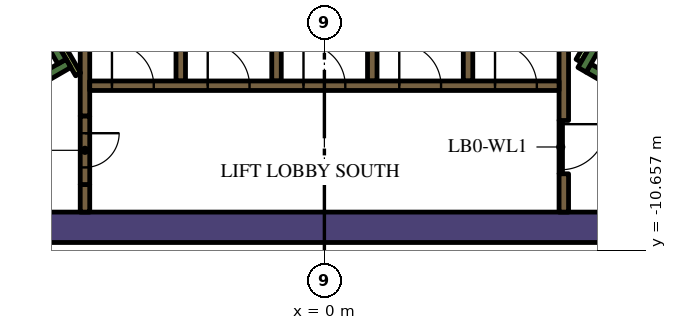
"""IFC4 building model, lengths in metres.
Left out: names, types, materials, properties, quantities, classifications, styles, units other than length and angle.
Written with IfcOpenShell. Run it as: python <this file> out.ifc"""

import sys

from ifc_helpers import new_model, si_unit, direction, frame, frame_2d, origin, place, context, subcontext, project, spatial, rectangle, extrude, element, fill, save


model = new_model("IFC4")
c1 = context("Model", 3, precision=1e-05, world=origin(), true_north=direction((0.0, 1.0)))
c2 = subcontext(c1, "Body", "Model", "MODEL_VIEW")
j1 = project(units=[si_unit("LENGTHUNIT", "METRE"), si_unit("PLANEANGLEUNIT", "RADIAN")], contexts=[c1])
p1 = place(None, origin())
s1 = spatial("IfcSite", under=j1, at=p1, CompositionType="ELEMENT")
p2 = place(p1, origin())
s2 = spatial("IfcBuilding", under=s1, at=p2, CompositionType="ELEMENT")
p3 = place(p2, frame((0.0, 0.0, 187.8)))
s3 = spatial("IfcBuildingStorey", under=s2, at=p3, CompositionType="ELEMENT", Elevation=187.8)
p4 = place(p3, frame((-13.378, -10.05, 0.0), z_axis=(0.0, 0.0, 1.0), x_axis=(1.0, 0.0, 0.0)))
e1 = element("IfcWall", 1, at=p4, inside=s3, PredefinedType="SOLIDWALL", context=c2, shape_type="SweptSolid", body=[
    extrude(rectangle(XDim=22.282, YDim=0.8, at=frame_2d((11.141, 0.0))), origin(), (0.0, 0.0, 1.0), 4.2),
])
p5 = place(p3, frame((12.84, -9.261, 0.0), z_axis=(0.0, 0.0, 1.0), x_axis=(-0.866013990052, 0.500019768644, 0.0)))
e2 = element("IfcWall", 2, at=p5, inside=s3, PredefinedType="SOLIDWALL", context=c2, shape_type="SweptSolid", body=[
    extrude(rectangle(XDim=6.8, YDim=0.25, at=frame_2d((3.4, 0.0))), origin(), (0.0, 0.0, 1.0), 4.2),
])
p6 = place(p3, frame((6.78, -5.906, 0.0), z_axis=(0.0, 0.0, 1.0), x_axis=(0.500223362819, 0.865896406789, 0.0)))
e3 = element("IfcWall", 3, at=p6, inside=s3, PredefinedType="SOLIDWALL", context=c2, shape_type="SweptSolid", body=[
    extrude(rectangle(XDim=0.675, YDim=0.25, at=frame_2d((0.337, 0.0))), origin(), (0.0, 0.0, 1.0), 4.2),
])
p7 = place(p3, frame((-12.84, -9.261, 0.0), z_axis=(0.0, 0.0, 1.0), x_axis=(0.866016039709, 0.500016218704, 0.0)))
e4 = element("IfcWall", 4, at=p7, inside=s3, PredefinedType="SOLIDWALL", context=c2, shape_type="SweptSolid", body=[
    extrude(rectangle(XDim=7.05, YDim=0.25, at=frame_2d((3.525, 0.0))), origin(), (0.0, 0.0, 1.0), 4.2),
])
p8 = place(p3, frame((-6.905, -5.69, 0.0), z_axis=(0.0, 0.0, 1.0), x_axis=(-0.500402024738, 0.865793170242, 0.0)))
e5 = element("IfcWall", 5, at=p8, inside=s3, PredefinedType="SOLIDWALL", context=c2, shape_type="SweptSolid", body=[
    extrude(rectangle(XDim=0.425, YDim=0.25, at=frame_2d((0.212, 0.0))), origin(), (0.0, 0.0, 1.0), 4.2),
])
p9 = place(p3, frame((-6.3, -8.925, 0.0), z_axis=(0.0, 0.0, 1.0), x_axis=(0.0, -1.0, 0.0)))
e6 = element("IfcWall", 6, at=p9, inside=s3, PredefinedType="SOLIDWALL", context=c2, shape_type="SweptSolid", body=[
    extrude(rectangle(XDim=0.725, YDim=0.25, at=frame_2d((0.363, 0.0))), origin(), (0.0, 0.0, 1.0), 4.2),
])
p10 = place(p3, frame((6.3, -7.24, 0.0), z_axis=(0.0, 0.0, 1.0), x_axis=(0.0, 1.0, 0.0)))
e7 = element("IfcWall", 7, at=p10, inside=s3, PredefinedType="SOLIDWALL", context=c2, shape_type="SweptSolid", body=[
    extrude(rectangle(XDim=3.24, YDim=0.25, at=frame_2d((1.62, 0.0))), origin(), (0.0, 0.0, 1.0), 4.2),
])
p11 = place(p3, frame((6.3, -9.65, 0.0), z_axis=(0.0, 0.0, 1.0), x_axis=(0.0, 1.0, 0.0)))
e8 = element("IfcWall", 8, at=p11, inside=s3, PredefinedType="SOLIDWALL", context=c2, shape_type="SweptSolid", body=[
    extrude(rectangle(XDim=1.008, YDim=0.25, at=frame_2d((0.504, 0.0))), origin(), (0.0, 0.0, 1.0), 4.2),
])
for number, where, z_axis, x_axis in (
    (9, (3.78, -4.0, 0.0), (0.0, 0.0, 1.0), (0.0, -1.0, 0.0)),
    (10, (1.26, -4.0, 0.0), (0.0, 0.0, 1.0), (0.0, -1.0, 0.0)),
    (11, (-1.26, -4.0, 0.0), (0.0, 0.0, 1.0), (0.0, -1.0, 0.0)),
    (12, (-3.78, -4.0, 0.0), (0.0, 0.0, 1.0), (0.0, -1.0, 0.0)),
):
    element("IfcWall", number, at=place(p3, frame(where, z_axis=z_axis, x_axis=x_axis)), inside=s3, PredefinedType="SOLIDWALL", context=c2, shape_type="SweptSolid", body=[
        extrude(rectangle(XDim=2.2, YDim=0.25, at=frame_2d((1.1, 0.0))), origin(), (0.0, 0.0, 1.0), 4.2),
    ])
p12 = place(p3, frame((-6.3, -7.125, 0.0), z_axis=(0.0, 0.0, 1.0), x_axis=(0.0, 1.0, 0.0)))
e13 = element("IfcWall", 13, at=p12, inside=s3, PredefinedType="SOLIDWALL", context=c2, shape_type="SweptSolid", body=[
    extrude(rectangle(XDim=3.125, YDim=0.25, at=frame_2d((1.562, 0.0))), origin(), (0.0, 0.0, 1.0), 4.2),
])
p13 = place(p3, frame((-6.48, -6.027, 0.0), z_axis=(0.0, 0.0, 1.0), x_axis=(-0.499927229454, 0.866067413802, 0.0)))
e14 = element("IfcWall", 14, at=p13, inside=s3, PredefinedType="PARTITIONING", context=c2, shape_type="SweptSolid", body=[
    extrude(rectangle(XDim=0.929, YDim=0.15, at=frame_2d((0.464, 0.0))), origin(), (0.0, 0.0, 1.0), 4.2),
])
p14 = place(p3, frame((6.945, -5.222, 0.0), z_axis=(0.0, 0.0, 1.0), x_axis=(-0.499818422106, -0.866130212453, 0.0)))
e15 = element("IfcWall", 15, at=p14, inside=s3, PredefinedType="PARTITIONING", context=c2, shape_type="SweptSolid", body=[
    extrude(rectangle(XDim=0.514, YDim=0.15, at=frame_2d((0.257, 0.0))), origin(), (0.0, 0.0, 1.0), 3.15),
])
p15 = place(p3, frame((-6.175, -6.325, 0.0), z_axis=(0.0, 0.0, 1.0), x_axis=(1.0, 0.0, 0.0)))
e16 = element("IfcWall", 16, at=p15, inside=s3, PredefinedType="SOLIDWALL", context=c2, shape_type="SweptSolid", body=[
    extrude(rectangle(XDim=12.35, YDim=0.25, at=frame_2d((6.175, 0.0))), origin(), (0.0, 0.0, 1.0), 4.2),
])
p16 = place(p15, frame((0.585, 0.0, 0.0)))
e17 = element("IfcOpeningElement", 17, at=p16, cuts=e16, PredefinedType="OPENING", context=c2, shape_type="SweptSolid", body=[
    extrude(rectangle(XDim=1.1, YDim=2.1, at=frame_2d((0.55, 1.05))), frame((0.0, 0.135, 0.0), z_axis=(0.0, -1.0, 0.0), x_axis=(1.0, 0.0, 0.0)), (0.0, 0.0, 1.0), 0.27),
])
p17 = place(p15, frame((3.105, 0.0, 0.0)))
e18 = element("IfcOpeningElement", 18, at=p17, cuts=e16, PredefinedType="OPENING", context=c2, shape_type="SweptSolid", body=[
    extrude(rectangle(XDim=1.1, YDim=2.1, at=frame_2d((0.55, 1.05))), frame((0.0, 0.135, 0.0), z_axis=(0.0, -1.0, 0.0), x_axis=(1.0, 0.0, 0.0)), (0.0, 0.0, 1.0), 0.27),
])
p18 = place(p15, frame((5.625, 0.0, 0.0)))
e19 = element("IfcOpeningElement", 19, at=p18, cuts=e16, PredefinedType="OPENING", context=c2, shape_type="SweptSolid", body=[
    extrude(rectangle(XDim=1.1, YDim=2.1, at=frame_2d((0.55, 1.05))), frame((0.0, 0.135, 0.0), z_axis=(0.0, -1.0, 0.0), x_axis=(1.0, 0.0, 0.0)), (0.0, 0.0, 1.0), 0.27),
])
p19 = place(p15, frame((8.145, 0.0, 0.0)))
e20 = element("IfcOpeningElement", 20, at=p19, cuts=e16, PredefinedType="OPENING", context=c2, shape_type="SweptSolid", body=[
    extrude(rectangle(XDim=1.1, YDim=2.1, at=frame_2d((0.55, 1.05))), frame((0.0, 0.135, 0.0), z_axis=(0.0, -1.0, 0.0), x_axis=(1.0, 0.0, 0.0)), (0.0, 0.0, 1.0), 0.27),
])
p20 = place(p15, frame((10.665, 0.0, 0.0)))
e21 = element("IfcOpeningElement", 21, at=p20, cuts=e16, PredefinedType="OPENING", context=c2, shape_type="SweptSolid", body=[
    extrude(rectangle(XDim=1.1, YDim=2.1, at=frame_2d((0.55, 1.05))), frame((0.0, 0.135, 0.0), z_axis=(0.0, -1.0, 0.0), x_axis=(1.0, 0.0, 0.0)), (0.0, 0.0, 1.0), 0.27),
])
p21 = place(p3, frame((-6.3, -7.125, 0.0), z_axis=(0.0, 0.0, 1.0), x_axis=(0.0, -1.0, 0.0)))
e22 = element("IfcWall", 22, at=p21, inside=s3, PredefinedType="SOLIDWALL", context=c2, shape_type="SweptSolid", body=[
    extrude(rectangle(XDim=1.8, YDim=0.25, at=frame_2d((0.9, 0.0))), origin(), (0.0, 0.0, 1.0), 4.2),
])
p22 = place(p21, frame((0.45, 0.0, 0.0)))
e23 = element("IfcOpeningElement", 23, at=p22, cuts=e22, PredefinedType="OPENING", context=c2, shape_type="SweptSolid", body=[
    extrude(rectangle(XDim=0.9, YDim=2.1, at=frame_2d((0.45, 1.05))), frame((0.0, 0.135, 0.0), z_axis=(0.0, -1.0, 0.0), x_axis=(1.0, 0.0, 0.0)), (0.0, 0.0, 1.0), 0.27),
])
p23 = place(p3, frame((6.22, -7.237, 0.0), z_axis=(0.0, 0.0, 1.0), x_axis=(0.0, -1.0, 0.0)))
e24 = element("IfcWall", 24, at=p23, inside=s3, PredefinedType="PARTITIONING", context=c2, shape_type="SweptSolid", body=[
    extrude(rectangle(XDim=1.4, YDim=0.09, at=frame_2d((0.7, 0.0))), origin(), (0.0, 0.0, 1.0), 3.15),
])
p24 = place(p23, frame((0.1, 0.0, 0.0)))
e25 = element("IfcOpeningElement", 25, at=p24, cuts=e24, PredefinedType="OPENING", context=c2, shape_type="SweptSolid", body=[
    extrude(rectangle(XDim=1.2, YDim=2.1, at=frame_2d((0.6, 1.05))), frame((0.0, 0.055, 0.0), z_axis=(0.0, -1.0, 0.0), x_axis=(1.0, 0.0, 0.0)), (0.0, 0.0, 1.0), 0.11),
])
p25 = place(p16, origin())
e26 = element("IfcDoor", 26, at=p25, inside=s3, OperationType="DOUBLE_DOOR_SLIDING", PredefinedType="DOOR", context=c2, shape_type="SweptSolid", body=[
    extrude(rectangle(XDim=1.1, YDim=2.1, at=frame_2d((0.55, 1.05))), frame((0.0, 0.025, 0.0), z_axis=(0.0, -1.0, 0.0), x_axis=(1.0, 0.0, 0.0)), (0.0, 0.0, 1.0), 0.05),
])
fill(e17, e26)
p26 = place(p17, origin())
e27 = element("IfcDoor", 27, at=p26, inside=s3, OperationType="DOUBLE_DOOR_SLIDING", PredefinedType="DOOR", context=c2, shape_type="SweptSolid", body=[
    extrude(rectangle(XDim=1.1, YDim=2.1, at=frame_2d((0.55, 1.05))), frame((0.0, 0.025, 0.0), z_axis=(0.0, -1.0, 0.0), x_axis=(1.0, 0.0, 0.0)), (0.0, 0.0, 1.0), 0.05),
])
fill(e18, e27)
p27 = place(p18, origin())
e28 = element("IfcDoor", 28, at=p27, inside=s3, OperationType="DOUBLE_DOOR_SLIDING", PredefinedType="DOOR", context=c2, shape_type="SweptSolid", body=[
    extrude(rectangle(XDim=1.1, YDim=2.1, at=frame_2d((0.55, 1.05))), frame((0.0, 0.025, 0.0), z_axis=(0.0, -1.0, 0.0), x_axis=(1.0, 0.0, 0.0)), (0.0, 0.0, 1.0), 0.05),
])
fill(e19, e28)
p28 = place(p19, origin())
e29 = element("IfcDoor", 29, at=p28, inside=s3, OperationType="DOUBLE_DOOR_SLIDING", PredefinedType="DOOR", context=c2, shape_type="SweptSolid", body=[
    extrude(rectangle(XDim=1.1, YDim=2.1, at=frame_2d((0.55, 1.05))), frame((0.0, 0.025, 0.0), z_axis=(0.0, -1.0, 0.0), x_axis=(1.0, 0.0, 0.0)), (0.0, 0.0, 1.0), 0.05),
])
fill(e20, e29)
p29 = place(p20, origin())
e30 = element("IfcDoor", 30, at=p29, inside=s3, OperationType="DOUBLE_DOOR_SLIDING", PredefinedType="DOOR", context=c2, shape_type="SweptSolid", body=[
    extrude(rectangle(XDim=1.1, YDim=2.1, at=frame_2d((0.55, 1.05))), frame((0.0, 0.025, 0.0), z_axis=(0.0, -1.0, 0.0), x_axis=(1.0, 0.0, 0.0)), (0.0, 0.0, 1.0), 0.05),
])
fill(e21, e30)
p30 = place(p22, origin())
e31 = element("IfcDoor", 31, at=p30, inside=s3, OperationType="SINGLE_SWING_LEFT", PredefinedType="DOOR", context=c2, shape_type="SweptSolid", body=[
    extrude(rectangle(XDim=0.9, YDim=2.1, at=frame_2d((0.45, 1.05))), frame((0.0, 0.025, 0.0), z_axis=(0.0, -1.0, 0.0), x_axis=(1.0, 0.0, 0.0)), (0.0, 0.0, 1.0), 0.05),
])
fill(e23, e31)
p31 = place(p24, origin())
e32 = element("IfcDoor", 32, at=p31, inside=s3, OperationType="SINGLE_SWING_LEFT", PredefinedType="DOOR", context=c2, shape_type="SweptSolid", body=[
    extrude(rectangle(XDim=1.2, YDim=2.1, at=frame_2d((0.6, 1.05))), frame((0.0, 0.025, 0.0), z_axis=(0.0, -1.0, 0.0), x_axis=(1.0, 0.0, 0.0)), (0.0, 0.0, 1.0), 0.05),
])
fill(e25, e32)
save(model, sys.argv[1])
